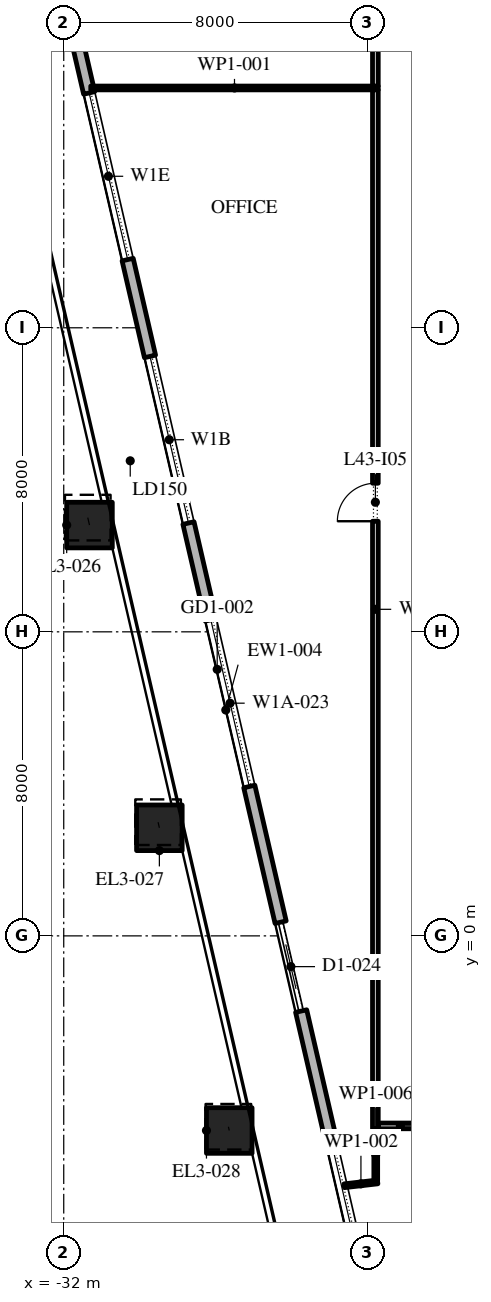
"""IFC4 building model, lengths in metres.
Left out: names, types, materials, properties, quantities, classifications, styles, units other than length and angle.
Written with IfcOpenShell. Run it as: python <this file> out.ifc"""

import sys

from ifc_helpers import new_model, si_unit, direction, frame, frame_2d, origin, origin_2d, place, context, subcontext, project, spatial, rectangle, extrude, element, fill, save


model = new_model("IFC4")
c1 = context("Model", 3, precision=1e-05, world=origin(), true_north=direction((0.0, 1.0)))
c2 = subcontext(c1, "Body", "Model", "MODEL_VIEW")
j1 = project(units=[si_unit("LENGTHUNIT", "METRE"), si_unit("PLANEANGLEUNIT", "RADIAN")], contexts=[c1])
p1 = place(None, origin())
s1 = spatial("IfcSite", under=j1, at=p1, CompositionType="ELEMENT")
p2 = place(p1, origin())
s2 = spatial("IfcBuilding", under=s1, at=p2, CompositionType="ELEMENT")
p3 = place(p2, frame((0.0, 0.0, 196.8)))
s3 = spatial("IfcBuildingStorey", under=s2, at=p3, CompositionType="ELEMENT", Elevation=196.8)
p4 = place(p3, frame((-31.323, 10.809, 0.0), z_axis=(-0.010741563911, 0.046740318638, 0.998849318675), x_axis=(-0.974594841169, -0.223975211946, 0.0)))
e1 = element("IfcColumn", 1, at=p4, inside=s3, PredefinedType="COLUMN", context=c2, shape_type="SweptSolid", body=[
    extrude(rectangle(XDim=1.2, YDim=1.2, at=origin_2d()), origin(), (0.0, 0.0, 1.0), 4.205),
])
p5 = place(p3, frame((-29.483, 2.844, 0.0), z_axis=(-0.008132835078, 0.035087374195, 0.999351156084), x_axis=(-0.97417327444, -0.225801752354, 0.0)))
e2 = element("IfcColumn", 2, at=p5, inside=s3, PredefinedType="COLUMN", context=c2, shape_type="SweptSolid", body=[
    extrude(rectangle(XDim=1.2, YDim=1.2, at=origin_2d()), origin(), (0.0, 0.0, 1.0), 4.203),
])
p6 = place(p3, frame((-27.645, -5.121, 0.0), z_axis=(-0.005404479485, 0.023361298418, 0.999712479335), x_axis=(-0.974268511785, -0.225390476607, 0.0)))
e3 = element("IfcColumn", 3, at=p6, inside=s3, PredefinedType="COLUMN", context=c2, shape_type="SweptSolid", body=[
    extrude(rectangle(XDim=1.2, YDim=1.2, at=origin_2d()), origin(), (0.0, 0.0, 1.0), 4.201),
])
p7 = place(p3, frame((-33.157, 30.092, 0.0), z_axis=(0.0, 0.0, 1.0), x_axis=(0.224950279389, -0.974370243697, 0.0)))
e4 = element("IfcWall", 4, at=p7, inside=s3, PredefinedType="STANDARD", context=c2, shape_type="SweptSolid", body=[
    extrude(rectangle(XDim=49.5, YDim=0.3, at=frame_2d((24.75, 0.0))), origin(), (0.0, 0.0, 1.0), 4.0),
])
p8 = place(p7, frame((2.207, 0.0, 0.0)))
e5 = element("IfcOpeningElement", 5, at=p8, cuts=e4, PredefinedType="OPENING", context=c2, shape_type="SweptSolid", body=[
    extrude(rectangle(XDim=2.4, YDim=3.5, at=frame_2d((1.2, 1.75))), frame((0.0, 0.16, 0.0), z_axis=(0.0, -1.0, 0.0), x_axis=(1.0, 0.0, 0.0)), (0.0, 0.0, 1.0), 0.32),
])
p9 = place(p7, frame((8.121, 0.0, 0.45)))
e6 = element("IfcOpeningElement", 6, at=p9, cuts=e4, PredefinedType="OPENING", context=c2, shape_type="SweptSolid", body=[
    extrude(rectangle(XDim=4.5, YDim=2.825, at=frame_2d((2.25, 1.413))), frame((0.0, 0.16, 0.0), z_axis=(0.0, -1.0, 0.0), x_axis=(1.0, 0.0, 0.0)), (0.0, 0.0, 1.0), 0.32),
])
p10 = place(p7, frame((15.236, 0.0, 0.45)))
e7 = element("IfcOpeningElement", 7, at=p10, cuts=e4, PredefinedType="OPENING", context=c2, shape_type="SweptSolid", body=[
    extrude(rectangle(XDim=4.5, YDim=2.95, at=frame_2d((2.25, 1.475))), frame((0.0, 0.16, 0.0), z_axis=(0.0, -1.0, 0.0), x_axis=(1.0, 0.0, 0.0)), (0.0, 0.0, 1.0), 0.32),
])
p11 = place(p7, frame((22.35, 0.0, 0.45)))
e8 = element("IfcOpeningElement", 8, at=p11, cuts=e4, PredefinedType="OPENING", context=c2, shape_type="SweptSolid", body=[
    extrude(rectangle(XDim=4.5, YDim=3.0, at=frame_2d((2.25, 1.5))), frame((0.0, 0.16, 0.0), z_axis=(0.0, -1.0, 0.0), x_axis=(1.0, 0.0, 0.0)), (0.0, 0.0, 1.0), 0.32),
])
p12 = place(p7, frame((30.514, 0.0, 0.0)))
e9 = element("IfcOpeningElement", 9, at=p12, cuts=e4, PredefinedType="OPENING", context=c2, shape_type="SweptSolid", body=[
    extrude(rectangle(XDim=2.4, YDim=3.5, at=frame_2d((1.2, 1.75))), frame((0.0, 0.16, 0.0), z_axis=(0.0, -1.0, 0.0), x_axis=(1.0, 0.0, 0.0)), (0.0, 0.0, 1.0), 0.32),
])
p13 = place(p7, frame((36.579, 0.0, 0.45)))
e10 = element("IfcOpeningElement", 10, at=p13, cuts=e4, PredefinedType="OPENING", context=c2, shape_type="SweptSolid", body=[
    extrude(rectangle(XDim=4.5, YDim=3.05, at=frame_2d((2.25, 1.525))), frame((0.0, 0.16, 0.0), z_axis=(0.0, -1.0, 0.0), x_axis=(1.0, 0.0, 0.0)), (0.0, 0.0, 1.0), 0.32),
])
p14 = place(p7, frame((43.693, 0.0, 0.45)))
e11 = element("IfcOpeningElement", 11, at=p14, cuts=e4, PredefinedType="OPENING", context=c2, shape_type="SweptSolid", body=[
    extrude(rectangle(XDim=4.5, YDim=3.05, at=frame_2d((2.25, 1.525))), frame((0.0, 0.16, 0.0), z_axis=(0.0, -1.0, 0.0), x_axis=(1.0, 0.0, 0.0)), (0.0, 0.0, 1.0), 0.32),
])
p15 = place(p3, frame((-31.289, 22.31, 0.0), z_axis=(0.0, 0.0, 1.0), x_axis=(1.0, 0.0, 0.0)))
e12 = element("IfcWall", 12, at=p15, inside=s3, PredefinedType="PARTITIONING", context=c2, shape_type="SweptSolid", body=[
    extrude(rectangle(XDim=7.564, YDim=0.1, at=frame_2d((3.782, 0.0))), origin(), (0.0, 0.0, 1.0), 4.0),
])
p16 = place(p3, frame((-24.62, -6.575, 0.0), z_axis=(0.0, 0.0, 1.0), x_axis=(0.993501545499, 0.113818623659, 0.0)))
e13 = element("IfcWall", 13, at=p16, inside=s3, PredefinedType="PARTITIONING", context=c2, shape_type="SweptSolid", body=[
    extrude(rectangle(XDim=0.886, YDim=0.1, at=frame_2d((0.443, 0.0))), origin(), (0.0, 0.0, 1.0), 4.0),
])
p17 = place(p3, frame((-23.8, -5.075, 0.0), z_axis=(0.0, 0.0, 1.0), x_axis=(0.0, 1.0, 0.0)))
e14 = element("IfcWall", 14, at=p17, inside=s3, PredefinedType="PARTITIONING", context=c2, shape_type="SweptSolid", body=[
    extrude(rectangle(XDim=27.335, YDim=0.15, at=frame_2d((13.667, 0.0))), origin(), (0.0, 0.0, 1.0), 4.0),
])
p18 = place(p17, frame((15.985, 0.0, 0.0)))
e15 = element("IfcOpeningElement", 15, at=p18, cuts=e14, PredefinedType="OPENING", context=c2, shape_type="SweptSolid", body=[
    extrude(rectangle(XDim=1.0, YDim=2.1, at=frame_2d((0.5, 1.05))), frame((0.0, 0.085, 0.0), z_axis=(0.0, -1.0, 0.0), x_axis=(1.0, 0.0, 0.0)), (0.0, 0.0, 1.0), 0.17),
])
p19 = place(p3, frame((-23.8, 22.36, 0.0), z_axis=(0.0, 0.0, 1.0), x_axis=(0.0, 1.0, 0.0)))
e16 = element("IfcWall", 16, at=p19, inside=s3, PredefinedType="PARTITIONING", context=c2, shape_type="SweptSolid", body=[
    extrude(rectangle(XDim=4.915, YDim=0.15, at=frame_2d((2.458, 0.0))), origin(), (0.0, 0.0, 1.0), 4.0),
])
p20 = place(p19, frame((2.94, 0.0, 0.0)))
e17 = element("IfcOpeningElement", 17, at=p20, cuts=e16, PredefinedType="OPENING", context=c2, shape_type="SweptSolid", body=[
    extrude(rectangle(XDim=1.0, YDim=2.1, at=frame_2d((0.5, 1.05))), frame((0.0, 0.085, 0.0), z_axis=(0.0, -1.0, 0.0), x_axis=(1.0, 0.0, 0.0)), (0.0, 0.0, 1.0), 0.17),
])
p21 = place(p3, frame((-23.79, -5.075, 0.0), z_axis=(0.0, 0.0, 1.0), x_axis=(0.0, -1.0, 0.0)))
e18 = element("IfcWall", 18, at=p21, inside=s3, PredefinedType="PARTITIONING", context=c2, shape_type="SweptSolid", body=[
    extrude(rectangle(XDim=1.355, YDim=0.1, at=frame_2d((0.677, 0.0))), origin(), (0.0, 0.0, 1.0), 4.0),
])
p22 = place(p3, frame((-22.57, -5.0, 0.0), z_axis=(0.0, 0.0, 1.0), x_axis=(-1.0, 0.0, 0.0)))
e19 = element("IfcWall", 19, at=p22, inside=s3, PredefinedType="PARTITIONING", context=c2, shape_type="SweptSolid", body=[
    extrude(rectangle(XDim=1.145, YDim=0.15, at=frame_2d((0.573, 0.0))), origin(), (0.0, 0.0, 1.0), 4.0),
])
p23 = place(p9, origin())
e20 = element("IfcWindow", 20, at=p23, inside=s3, PartitioningType="DOUBLE_PANEL_VERTICAL", PredefinedType="WINDOW", context=c2, shape_type="SweptSolid", body=[
    extrude(rectangle(XDim=4.5, YDim=2.825, at=frame_2d((2.25, 1.413))), frame((0.0, 0.03, 0.0), z_axis=(0.0, -1.0, 0.0), x_axis=(1.0, 0.0, 0.0)), (0.0, 0.0, 1.0), 0.06),
])
fill(e6, e20)
p24 = place(p10, origin())
e21 = element("IfcWindow", 21, at=p24, inside=s3, PartitioningType="DOUBLE_PANEL_VERTICAL", PredefinedType="WINDOW", context=c2, shape_type="SweptSolid", body=[
    extrude(rectangle(XDim=4.5, YDim=2.95, at=frame_2d((2.25, 1.475))), frame((0.0, 0.03, 0.0), z_axis=(0.0, -1.0, 0.0), x_axis=(1.0, 0.0, 0.0)), (0.0, 0.0, 1.0), 0.06),
])
fill(e7, e21)
p25 = place(p11, origin())
e22 = element("IfcWindow", 22, at=p25, inside=s3, PartitioningType="DOUBLE_PANEL_VERTICAL", PredefinedType="WINDOW", context=c2, shape_type="SweptSolid", body=[
    extrude(rectangle(XDim=4.5, YDim=3.0, at=frame_2d((2.25, 1.5))), frame((0.0, 0.03, 0.0), z_axis=(0.0, -1.0, 0.0), x_axis=(1.0, 0.0, 0.0)), (0.0, 0.0, 1.0), 0.06),
])
fill(e8, e22)
p26 = place(p12, origin())
e23 = element("IfcDoor", 23, at=p26, inside=s3, OperationType="DOUBLE_DOOR_SLIDING", PredefinedType="DOOR", context=c2, shape_type="SweptSolid", body=[
    extrude(rectangle(XDim=2.4, YDim=3.5, at=frame_2d((1.2, 1.75))), frame((0.0, 0.025, 0.0), z_axis=(0.0, -1.0, 0.0), x_axis=(1.0, 0.0, 0.0)), (0.0, 0.0, 1.0), 0.05),
])
fill(e9, e23)
p27 = place(p13, origin())
e24 = element("IfcWindow", 24, at=p27, inside=s3, PartitioningType="DOUBLE_PANEL_VERTICAL", PredefinedType="WINDOW", context=c2, shape_type="SweptSolid", body=[
    extrude(rectangle(XDim=4.5, YDim=3.05, at=frame_2d((2.25, 1.525))), frame((0.0, 0.03, 0.0), z_axis=(0.0, -1.0, 0.0), x_axis=(1.0, 0.0, 0.0)), (0.0, 0.0, 1.0), 0.06),
])
fill(e10, e24)
p28 = place(p18, origin())
e25 = element("IfcDoor", 25, at=p28, inside=s3, OperationType="SINGLE_SWING_RIGHT", PredefinedType="DOOR", context=c2, shape_type="SweptSolid", body=[
    extrude(rectangle(XDim=1.0, YDim=2.1, at=frame_2d((0.5, 1.05))), frame((0.0, 0.025, 0.0), z_axis=(0.0, -1.0, 0.0), x_axis=(1.0, 0.0, 0.0)), (0.0, 0.0, 1.0), 0.05),
])
fill(e15, e25)
save(model, sys.argv[1])
